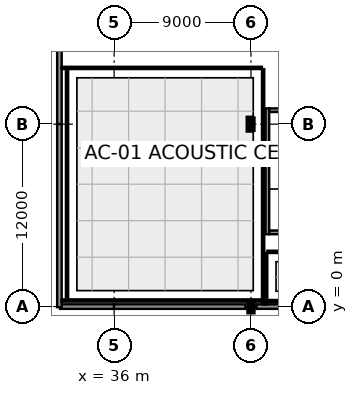
"""IFC4 building model, lengths in metres.
Left out: names, types, materials, properties, quantities, classifications, styles, units other than length and angle.
Written with IfcOpenShell. Run it as: python <this file> out.ifc"""

import sys

from ifc_helpers import new_model, si_unit, direction, frame, frame_2d, origin, origin_2d, place, context, subcontext, project, spatial, rectangle, i_section, extrude, element, fill, save


model = new_model("IFC4")
c1 = context("Model", 3, precision=1e-05, world=origin(), true_north=direction((0.0, 1.0)))
c2 = subcontext(c1, "Body", "Model", "MODEL_VIEW")
j1 = project(units=[si_unit("LENGTHUNIT", "METRE"), si_unit("PLANEANGLEUNIT", "RADIAN")], contexts=[c1])
p1 = place(None, origin())
s1 = spatial("IfcSite", under=j1, at=p1, CompositionType="ELEMENT")
p2 = place(p1, origin())
s2 = spatial("IfcBuilding", under=s1, at=p2, CompositionType="ELEMENT")
p3 = place(p2, frame((0.0, 0.0, 5.4)))
s3 = spatial("IfcBuildingStorey", under=s2, at=p3, CompositionType="ELEMENT", Elevation=5.4)
for number, where, z_axis, x_axis in (
    (1, (45.0, 0.0, 0.0), (0.0, 0.0, 1.0), (0.0, 1.0, 0.0)),
    (2, (45.0, 12.0, 0.0), (0.0, 0.0, 1.0), (1.0, 0.0, 0.0)),
):
    element("IfcColumn", number, at=place(p3, frame(where, z_axis=z_axis, x_axis=x_axis)), inside=s3, PredefinedType="COLUMN", context=c2, shape_type="SweptSolid", body=[
        extrude(i_section(OverallWidth=0.304, OverallDepth=0.716, WebThickness=0.021, FlangeThickness=0.04, at=origin_2d()), origin(), (0.0, 0.0, 1.0), 4.5),
    ])
p4 = place(p3, frame((32.44, 0.0, 0.0), z_axis=(0.0, 0.0, 1.0), x_axis=(1.0, 0.0, 0.0)))
e3 = element("IfcWall", 3, at=p4, inside=s3, PredefinedType="SOLIDWALL", context=c2, shape_type="SweptSolid", body=[
    extrude(rectangle(XDim=3.57, YDim=0.3, at=frame_2d((1.785, 0.0))), origin(), (0.0, 0.0, 1.0), 3.147),
])
p5 = place(p3, frame((35.99, 0.0, 0.0), z_axis=(0.0, 0.0, 1.0), x_axis=(1.0, 0.0, 0.0)))
e4 = element("IfcWall", 4, at=p5, inside=s3, PredefinedType="SOLIDWALL", context=c2, shape_type="SweptSolid", body=[
    extrude(rectangle(XDim=8.654, YDim=0.3, at=frame_2d((4.327, 0.0))), origin(), (0.0, 0.0, 1.0), 3.147),
])
p6 = place(p3, frame((45.356, 0.0, 0.0), z_axis=(0.0, 0.0, 1.0), x_axis=(1.0, 0.0, 0.0)))
e5 = element("IfcWall", 5, at=p6, inside=s3, PredefinedType="SOLIDWALL", context=c2, shape_type="SweptSolid", body=[
    extrude(rectangle(XDim=8.636, YDim=0.3, at=frame_2d((4.318, 0.0))), origin(), (0.0, 0.0, 1.0), 3.147),
])
p7 = place(p6, frame((1.941, 0.0, 0.9)))
e6 = element("IfcOpeningElement", 6, at=p7, cuts=e5, PredefinedType="OPENING", context=c2, shape_type="SweptSolid", body=[
    extrude(rectangle(XDim=1.3, YDim=1.3, at=frame_2d((0.65, 0.65))), frame((0.0, 0.165, 0.0), z_axis=(0.0, -1.0, 0.0), x_axis=(1.0, 0.0, 0.0)), (0.0, 0.0, 1.0), 0.33),
])
p8 = place(p6, frame((5.395, 0.0, 0.9)))
e7 = element("IfcOpeningElement", 7, at=p8, cuts=e5, PredefinedType="OPENING", context=c2, shape_type="SweptSolid", body=[
    extrude(rectangle(XDim=1.3, YDim=1.3, at=frame_2d((0.65, 0.65))), frame((0.0, 0.165, 0.0), z_axis=(0.0, -1.0, 0.0), x_axis=(1.0, 0.0, 0.0)), (0.0, 0.0, 1.0), 0.33),
])
p9 = place(p3, frame((32.4, 23.96, 0.0), z_axis=(0.0, 0.0, 1.0), x_axis=(0.0, -1.0, 0.0)))
e8 = element("IfcWall", 8, at=p9, inside=s3, PredefinedType="SOLIDWALL", context=c2, shape_type="SweptSolid", body=[
    extrude(rectangle(XDim=11.97, YDim=0.3, at=frame_2d((5.985, 0.0))), origin(), (0.0, 0.0, 1.0), 3.455),
])
p10 = place(p9, frame((2.941, 0.0, 0.9)))
e9 = element("IfcOpeningElement", 9, at=p10, cuts=e8, PredefinedType="OPENING", context=c2, shape_type="SweptSolid", body=[
    extrude(rectangle(XDim=1.3, YDim=1.3, at=frame_2d((0.65, 0.65))), frame((0.0, 0.165, 0.0), z_axis=(0.0, -1.0, 0.0), x_axis=(1.0, 0.0, 0.0)), (0.0, 0.0, 1.0), 0.33),
])
p11 = place(p9, frame((8.5, 0.0, 0.9)))
e10 = element("IfcOpeningElement", 10, at=p11, cuts=e8, PredefinedType="OPENING", context=c2, shape_type="SweptSolid", body=[
    extrude(rectangle(XDim=1.3, YDim=1.3, at=frame_2d((0.65, 0.65))), frame((0.0, 0.165, 0.0), z_axis=(0.0, -1.0, 0.0), x_axis=(1.0, 0.0, 0.0)), (0.0, 0.0, 1.0), 0.33),
])
p12 = place(p3, frame((32.4, 12.01, 0.0), z_axis=(0.0, 0.0, 1.0), x_axis=(0.0, -1.0, 0.0)))
e11 = element("IfcWall", 11, at=p12, inside=s3, PredefinedType="SOLIDWALL", context=c2, shape_type="SweptSolid", body=[
    extrude(rectangle(XDim=12.05, YDim=0.3, at=frame_2d((6.025, 0.0))), origin(), (0.0, 0.0, 1.0), 3.455),
])
p13 = place(p12, frame((2.965, 0.0, 0.9)))
e12 = element("IfcOpeningElement", 12, at=p13, cuts=e11, PredefinedType="OPENING", context=c2, shape_type="SweptSolid", body=[
    extrude(rectangle(XDim=1.3, YDim=1.3, at=frame_2d((0.65, 0.65))), frame((0.0, 0.165, 0.0), z_axis=(0.0, -1.0, 0.0), x_axis=(1.0, 0.0, 0.0)), (0.0, 0.0, 1.0), 0.33),
])
p14 = place(p12, frame((7.785, 0.0, 0.9)))
e13 = element("IfcOpeningElement", 13, at=p14, cuts=e11, PredefinedType="OPENING", context=c2, shape_type="SweptSolid", body=[
    extrude(rectangle(XDim=1.3, YDim=1.3, at=frame_2d((0.65, 0.65))), frame((0.0, 0.165, 0.0), z_axis=(0.0, -1.0, 0.0), x_axis=(1.0, 0.0, 0.0)), (0.0, 0.0, 1.0), 0.33),
])
p15 = place(p3, frame((46.08, 4.76, 0.0), z_axis=(0.0, 0.0, 1.0), x_axis=(0.0, 1.0, 0.0)))
e14 = element("IfcWall", 14, at=p15, inside=s3, PredefinedType="SHEAR", context=c2, shape_type="SweptSolid", body=[
    extrude(rectangle(XDim=8.28, YDim=0.24, at=frame_2d((4.14, 0.0))), origin(), (0.0, 0.0, 1.0), 4.31),
])
for number, where, z_axis, x_axis in (
    (15, (46.2, 4.88, 0.0), (0.0, 0.0, 1.0), (1.0, 0.0, 0.0)),
    (16, (46.2, 12.92, 0.0), (0.0, 0.0, 1.0), (1.0, 0.0, 0.0)),
):
    element("IfcWall", number, at=place(p3, frame(where, z_axis=z_axis, x_axis=x_axis)), inside=s3, PredefinedType="SHEAR", context=c2, shape_type="SweptSolid", body=[
        extrude(rectangle(XDim=3.7, YDim=0.24, at=frame_2d((1.85, 0.0))), origin(), (0.0, 0.0, 1.0), 4.31),
    ])
p16 = place(p3, frame((71.92, 0.36, 0.0), z_axis=(0.0, 0.0, 1.0), x_axis=(-1.0, 0.0, 0.0)))
e17 = element("IfcWall", 17, at=p16, inside=s3, PredefinedType="PARTITIONING", context=c2, shape_type="SweptSolid", body=[
    extrude(rectangle(XDim=25.84, YDim=0.15, at=frame_2d((12.92, 0.0))), origin(), (0.0, 0.0, 1.0), 4.14),
])
p17 = place(p3, frame((46.0, 0.145, 0.0), z_axis=(0.0, 0.0, 1.0), x_axis=(0.0, 1.0, 0.0)))
e18 = element("IfcWall", 18, at=p17, inside=s3, PredefinedType="PARTITIONING", context=c2, shape_type="SweptSolid", body=[
    extrude(rectangle(XDim=3.375, YDim=0.15, at=frame_2d((1.688, 0.0))), origin(), (0.0, 0.0, 1.0), 4.14),
])
p18 = place(p3, frame((46.08, 3.6, 0.0), z_axis=(0.0, 0.0, 1.0), x_axis=(1.0, 0.0, 0.0)))
e19 = element("IfcWall", 19, at=p18, inside=s3, PredefinedType="PARTITIONING", context=c2, shape_type="SweptSolid", body=[
    extrude(rectangle(XDim=71.04, YDim=0.15, at=frame_2d((35.52, 0.0))), origin(), (0.0, 0.0, 1.0), 4.14),
])
p19 = place(p18, frame((31.995, 0.0, 0.0)))
e20 = element("IfcOpeningElement", 20, at=p19, cuts=e19, PredefinedType="OPENING", context=c2, shape_type="SweptSolid", body=[
    extrude(rectangle(XDim=1.05, YDim=2.25, at=frame_2d((0.525, 1.125))), frame((0.0, 0.09, 0.0), z_axis=(0.0, -1.0, 0.0), x_axis=(1.0, 0.0, 0.0)), (0.0, 0.0, 1.0), 0.18),
])
p20 = place(p18, frame((68.39, 0.0, 1.05)))
e21 = element("IfcOpeningElement", 21, at=p20, cuts=e19, PredefinedType="OPENING", context=c2, shape_type="SweptSolid", body=[
    extrude(rectangle(XDim=1.8, YDim=1.1, at=frame_2d((0.9, 0.55))), frame((0.0, 0.09, 0.0), z_axis=(0.0, -1.0, 0.0), x_axis=(1.0, 0.0, 0.0)), (0.0, 0.0, 1.0), 0.18),
])
p21 = place(p3, frame((32.545, 15.7, 0.0), z_axis=(0.0, 0.0, 1.0), x_axis=(1.0, 0.0, 0.0)))
e22 = element("IfcWall", 22, at=p21, inside=s3, PredefinedType="PARTITIONING", context=c2, shape_type="SweptSolid", body=[
    extrude(rectangle(XDim=13.175, YDim=0.15, at=frame_2d((6.587, 0.0))), origin(), (0.0, 0.0, 1.0), 4.14),
])
p22 = place(p21, frame((6.062, 0.0, 0.0)))
e23 = element("IfcOpeningElement", 23, at=p22, cuts=e22, PredefinedType="OPENING", context=c2, shape_type="SweptSolid", body=[
    extrude(rectangle(XDim=1.05, YDim=2.25, at=frame_2d((0.525, 1.125))), frame((0.0, 0.09, 0.0), z_axis=(0.0, -1.0, 0.0), x_axis=(1.0, 0.0, 0.0)), (0.0, 0.0, 1.0), 0.18),
])
p23 = place(p3, frame((45.8, 15.62, 0.0), z_axis=(0.0, 0.0, 1.0), x_axis=(0.0, -1.0, 0.0)))
e24 = element("IfcWall", 24, at=p23, inside=s3, PredefinedType="PARTITIONING", context=c2, shape_type="SweptSolid", body=[
    extrude(rectangle(XDim=15.475, YDim=0.15, at=frame_2d((7.738, 0.0))), origin(), (0.0, 0.0, 1.0), 4.14),
])
p24 = place(p3, frame((45.73, 0.4, 0.0), z_axis=(0.0, 0.0, 1.0), x_axis=(-1.0, 0.0, 0.0)))
e25 = element("IfcWall", 25, at=p24, inside=s3, PredefinedType="PARTITIONING", context=c2, shape_type="SweptSolid", body=[
    extrude(rectangle(XDim=13.185, YDim=0.15, at=frame_2d((6.593, 0.0))), origin(), (0.0, 0.0, 1.0), 4.14),
])
p25 = place(p3, frame((32.9, 0.47, 0.0), z_axis=(0.0, 0.0, 1.0), x_axis=(0.0, 1.0, 0.0)))
e26 = element("IfcWall", 26, at=p25, inside=s3, PredefinedType="PARTITIONING", context=c2, shape_type="SweptSolid", body=[
    extrude(rectangle(XDim=15.16, YDim=0.15, at=frame_2d((7.58, 0.0))), origin(), (0.0, 0.0, 1.0), 4.14),
])
p26 = place(p11, origin())
e27 = element("IfcWindow", 27, at=p26, inside=s3, PartitioningType="SINGLE_PANEL", PredefinedType="WINDOW", context=c2, shape_type="SweptSolid", body=[
    extrude(rectangle(XDim=1.3, YDim=1.3, at=frame_2d((0.65, 0.65))), frame((0.0, 0.03, 0.0), z_axis=(0.0, -1.0, 0.0), x_axis=(1.0, 0.0, 0.0)), (0.0, 0.0, 1.0), 0.06),
])
fill(e10, e27)
p27 = place(p13, origin())
e28 = element("IfcWindow", 28, at=p27, inside=s3, PartitioningType="SINGLE_PANEL", PredefinedType="WINDOW", context=c2, shape_type="SweptSolid", body=[
    extrude(rectangle(XDim=1.3, YDim=1.3, at=frame_2d((0.65, 0.65))), frame((0.0, 0.03, 0.0), z_axis=(0.0, -1.0, 0.0), x_axis=(1.0, 0.0, 0.0)), (0.0, 0.0, 1.0), 0.06),
])
fill(e12, e28)
p28 = place(p14, origin())
e29 = element("IfcWindow", 29, at=p28, inside=s3, PartitioningType="SINGLE_PANEL", PredefinedType="WINDOW", context=c2, shape_type="SweptSolid", body=[
    extrude(rectangle(XDim=1.3, YDim=1.3, at=frame_2d((0.65, 0.65))), frame((0.0, 0.03, 0.0), z_axis=(0.0, -1.0, 0.0), x_axis=(1.0, 0.0, 0.0)), (0.0, 0.0, 1.0), 0.06),
])
fill(e13, e29)
p29 = place(p22, frame((1.05, 0.0, 0.0), z_axis=(0.0, 0.0, 1.0), x_axis=(-1.0, 0.0, 0.0)))
e30 = element("IfcDoor", 30, at=p29, inside=s3, OperationType="SINGLE_SWING_RIGHT", PredefinedType="DOOR", context=c2, shape_type="SweptSolid", body=[
    extrude(rectangle(XDim=1.05, YDim=2.25, at=frame_2d((0.525, 1.125))), frame((0.0, 0.025, 0.0), z_axis=(0.0, -1.0, 0.0), x_axis=(1.0, 0.0, 0.0)), (0.0, 0.0, 1.0), 0.05),
])
fill(e23, e30)
save(model, sys.argv[1])
